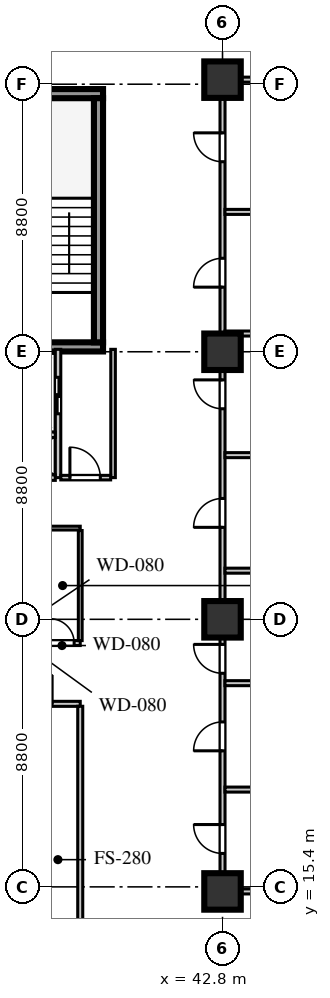
"""IFC4 building model, lengths in metres.
Left out: names, types, materials, properties, quantities, classifications, styles, units other than length and angle.
Written with IfcOpenShell. Run it as: python <this file> out.ifc"""

import sys

from ifc_helpers import new_model, si_unit, direction, frame, frame_2d, origin, origin_2d, place, context, subcontext, project, spatial, rectangle, extrude, element, fill, save


model = new_model("IFC4")
c1 = context("Model", 3, precision=1e-05, world=origin(), true_north=direction((0.0, 1.0)))
c2 = subcontext(c1, "Body", "Model", "MODEL_VIEW")
j1 = project(units=[si_unit("LENGTHUNIT", "METRE"), si_unit("PLANEANGLEUNIT", "RADIAN")], contexts=[c1])
p1 = place(None, origin())
s1 = spatial("IfcSite", under=j1, at=p1, CompositionType="ELEMENT")
p2 = place(p1, origin())
s2 = spatial("IfcBuilding", under=s1, at=p2, CompositionType="ELEMENT")
p3 = place(p2, frame((0.0, 0.0, 66.0)))
s3 = spatial("IfcBuildingStorey", under=s2, at=p3, CompositionType="ELEMENT", Elevation=66.0)
for number, where, z_axis, x_axis in (
    (1, (34.4, 33.16, 0.0), (0.0, 0.0, 1.0), (1.0, 0.0, 0.0)),
    (2, (34.4, 41.49, 0.0), (0.0, 0.0, 1.0), (1.0, 0.0, 0.0)),
):
    element("IfcWall", number, at=place(p3, frame(where, z_axis=z_axis, x_axis=x_axis)), inside=s3, PredefinedType="SHEAR", context=c2, shape_type="SweptSolid", body=[
        extrude(rectangle(XDim=4.47, YDim=0.3, at=frame_2d((2.235, 0.0))), origin(), (0.0, 0.0, 1.0), 3.72),
    ])
p4 = place(p3, frame((38.72, 33.31, 0.0), z_axis=(0.0, 0.0, 1.0), x_axis=(0.0, 1.0, 0.0)))
e3 = element("IfcWall", 3, at=p4, inside=s3, PredefinedType="SHEAR", context=c2, shape_type="SweptSolid", body=[
    extrude(rectangle(XDim=8.03, YDim=0.3, at=frame_2d((4.015, 0.0))), origin(), (0.0, 0.0, 1.0), 3.72),
])
for number, where, z_axis, x_axis in (
    (4, (42.8, 15.25, 0.0), (0.0, 0.0, 1.0), (1.0, 0.0, 0.0)),
    (5, (42.8, 24.2, 0.0), (0.0, 0.0, 1.0), (1.0, 0.0, 0.0)),
    (6, (42.8, 33.0, 0.0), (0.0, 0.0, 1.0), (1.0, 0.0, 0.0)),
    (7, (42.8, 41.95, 0.0), (0.0, 0.0, 1.0), (1.0, 0.0, 0.0)),
):
    element("IfcColumn", number, at=place(p3, frame(where, z_axis=z_axis, x_axis=x_axis)), inside=s3, PredefinedType="COLUMN", context=c2, shape_type="SweptSolid", body=[
        extrude(rectangle(XDim=1.2, YDim=1.2, at=origin_2d()), origin(), (0.0, 0.0, 1.0), 3.72),
    ])
p5 = place(p3, frame((37.39, 28.86, 0.0), z_axis=(0.0, 0.0, 1.0), x_axis=(0.0, 1.0, 0.0)))
e8 = element("IfcWall", 8, at=p5, inside=s3, PredefinedType="SOLIDWALL", context=c2, shape_type="SweptSolid", body=[
    extrude(rectangle(XDim=4.22, YDim=0.18, at=frame_2d((2.11, 0.0))), origin(), (0.0, 0.0, 1.0), 3.72),
])
p6 = place(p5, frame((2.1, 0.0, 0.0)))
e9 = element("IfcOpeningElement", 9, at=p6, cuts=e8, PredefinedType="OPENING", context=c2, shape_type="SweptSolid", body=[
    extrude(rectangle(XDim=1.2, YDim=2.12, at=frame_2d((0.6, 1.06))), frame((0.0, 0.1, 0.0), z_axis=(0.0, -1.0, 0.0), x_axis=(1.0, 0.0, 0.0)), (0.0, 0.0, 1.0), 0.2),
])
for number, where, z_axis, x_axis in (
    (10, (35.05, 28.86, 0.0), (0.0, 0.0, 1.0), (1.0, 0.0, 0.0)),
    (11, (35.05, 30.27, 0.0), (0.0, 0.0, 1.0), (1.0, 0.0, 0.0)),
):
    element("IfcWall", number, at=place(p3, frame(where, z_axis=z_axis, x_axis=x_axis)), inside=s3, PredefinedType="SOLIDWALL", context=c2, shape_type="SweptSolid", body=[
        extrude(rectangle(XDim=2.25, YDim=0.18, at=frame_2d((1.125, 0.0))), origin(), (0.0, 0.0, 1.0), 3.72),
    ])
p7 = place(p3, frame((39.2, 28.86, 0.0), z_axis=(0.0, 0.0, 1.0), x_axis=(0.0, 1.0, 0.0)))
e12 = element("IfcWall", 12, at=p7, inside=s3, PredefinedType="PARTITIONING", context=c2, shape_type="SweptSolid", body=[
    extrude(rectangle(XDim=4.22, YDim=0.15, at=frame_2d((2.11, 0.0))), origin(), (0.0, 0.0, 1.0), 3.72),
])
p8 = place(p3, frame((37.48, 28.86, 0.0), z_axis=(0.0, 0.0, 1.0), x_axis=(1.0, 0.0, 0.0)))
e13 = element("IfcWall", 13, at=p8, inside=s3, PredefinedType="PARTITIONING", context=c2, shape_type="SweptSolid", body=[
    extrude(rectangle(XDim=1.64, YDim=0.15, at=frame_2d((0.82, 0.0))), origin(), (0.0, 0.0, 1.0), 3.72),
])
p9 = place(p8, frame((0.3, 0.0, 0.0)))
e14 = element("IfcOpeningElement", 14, at=p9, cuts=e13, PredefinedType="OPENING", context=c2, shape_type="SweptSolid", body=[
    extrude(rectangle(XDim=1.0, YDim=2.1, at=frame_2d((0.5, 1.05))), frame((0.0, 0.085, 0.0), z_axis=(0.0, -1.0, 0.0), x_axis=(1.0, 0.0, 0.0)), (0.0, 0.0, 1.0), 0.17),
])
p10 = place(p3, frame((25.25, 21.42, 0.0), z_axis=(0.0, 0.0, 1.0), x_axis=(1.0, 0.0, 0.0)))
e15 = element("IfcWall", 15, at=p10, inside=s3, PredefinedType="PARTITIONING", context=c2, shape_type="SweptSolid", body=[
    extrude(rectangle(XDim=12.87, YDim=0.165, at=frame_2d((6.435, 0.0))), origin(), (0.0, 0.0, 1.0), 3.32),
])
p11 = place(p10, frame((0.825, 0.0, 0.0)))
e16 = element("IfcOpeningElement", 16, at=p11, cuts=e15, PredefinedType="OPENING", context=c2, shape_type="SweptSolid", body=[
    extrude(rectangle(XDim=0.95, YDim=2.08, at=frame_2d((0.475, 1.04))), frame((0.0, 0.093, 0.0), z_axis=(0.0, -1.0, 0.0), x_axis=(1.0, 0.0, 0.0)), (0.0, 0.0, 1.0), 0.185),
])
p12 = place(p10, frame((3.325, 0.0, 0.0)))
e17 = element("IfcOpeningElement", 17, at=p12, cuts=e15, PredefinedType="OPENING", context=c2, shape_type="SweptSolid", body=[
    extrude(rectangle(XDim=0.95, YDim=2.08, at=frame_2d((0.475, 1.04))), frame((0.0, 0.093, 0.0), z_axis=(0.0, -1.0, 0.0), x_axis=(1.0, 0.0, 0.0)), (0.0, 0.0, 1.0), 0.185),
])
p13 = place(p10, frame((5.825, 0.0, 0.0)))
e18 = element("IfcOpeningElement", 18, at=p13, cuts=e15, PredefinedType="OPENING", context=c2, shape_type="SweptSolid", body=[
    extrude(rectangle(XDim=0.95, YDim=2.08, at=frame_2d((0.475, 1.04))), frame((0.0, 0.093, 0.0), z_axis=(0.0, -1.0, 0.0), x_axis=(1.0, 0.0, 0.0)), (0.0, 0.0, 1.0), 0.185),
])
p14 = place(p10, frame((8.375, 0.0, 0.0)))
e19 = element("IfcOpeningElement", 19, at=p14, cuts=e15, PredefinedType="OPENING", context=c2, shape_type="SweptSolid", body=[
    extrude(rectangle(XDim=0.95, YDim=2.08, at=frame_2d((0.475, 1.04))), frame((0.0, 0.093, 0.0), z_axis=(0.0, -1.0, 0.0), x_axis=(1.0, 0.0, 0.0)), (0.0, 0.0, 1.0), 0.185),
])
p15 = place(p10, frame((10.995, 0.0, 0.0)))
e20 = element("IfcOpeningElement", 20, at=p15, cuts=e15, PredefinedType="OPENING", context=c2, shape_type="SweptSolid", body=[
    extrude(rectangle(XDim=0.95, YDim=2.08, at=frame_2d((0.475, 1.04))), frame((0.0, 0.093, 0.0), z_axis=(0.0, -1.0, 0.0), x_axis=(1.0, 0.0, 0.0)), (0.0, 0.0, 1.0), 0.185),
])
p16 = place(p3, frame((38.12, 6.88, 0.0), z_axis=(0.0, 0.0, 1.0), x_axis=(0.0, 1.0, 0.0)))
e21 = element("IfcWall", 21, at=p16, inside=s3, PredefinedType="PARTITIONING", context=c2, shape_type="SweptSolid", body=[
    extrude(rectangle(XDim=14.46, YDim=0.165, at=frame_2d((7.23, 0.0))), origin(), (0.0, 0.0, 1.0), 3.72),
])
p17 = place(p3, frame((34.6, 23.42, 0.0), z_axis=(0.0, 0.0, 1.0), x_axis=(1.0, 0.0, 0.0)))
e22 = element("IfcWall", 22, at=p17, inside=s3, PredefinedType="PARTITIONING", context=c2, shape_type="SweptSolid", body=[
    extrude(rectangle(XDim=3.52, YDim=0.165, at=frame_2d((1.76, 0.0))), origin(), (0.0, 0.0, 1.0), 3.72),
])
p18 = place(p17, frame((0.22, 0.0, 0.0)))
e23 = element("IfcOpeningElement", 23, at=p18, cuts=e22, PredefinedType="OPENING", context=c2, shape_type="SweptSolid", body=[
    extrude(rectangle(XDim=0.8, YDim=2.05, at=frame_2d((0.4, 1.025))), frame((0.0, 0.093, 0.0), z_axis=(0.0, -1.0, 0.0), x_axis=(1.0, 0.0, 0.0)), (0.0, 0.0, 1.0), 0.185),
])
p19 = place(p17, frame((1.38, 0.0, 0.0)))
e24 = element("IfcOpeningElement", 24, at=p19, cuts=e22, PredefinedType="OPENING", context=c2, shape_type="SweptSolid", body=[
    extrude(rectangle(XDim=0.8, YDim=2.05, at=frame_2d((0.4, 1.025))), frame((0.0, 0.093, 0.0), z_axis=(0.0, -1.0, 0.0), x_axis=(1.0, 0.0, 0.0)), (0.0, 0.0, 1.0), 0.185),
])
p20 = place(p17, frame((2.52, 0.0, 0.0)))
e25 = element("IfcOpeningElement", 25, at=p20, cuts=e22, PredefinedType="OPENING", context=c2, shape_type="SweptSolid", body=[
    extrude(rectangle(XDim=0.8, YDim=2.05, at=frame_2d((0.4, 1.025))), frame((0.0, 0.093, 0.0), z_axis=(0.0, -1.0, 0.0), x_axis=(1.0, 0.0, 0.0)), (0.0, 0.0, 1.0), 0.185),
])
p21 = place(p3, frame((42.8, 15.25, 0.0), z_axis=(0.0, 0.0, 1.0), x_axis=(0.0, 1.0, 0.0)))
e26 = element("IfcWall", 26, at=p21, inside=s3, PredefinedType="PARTITIONING", context=c2, shape_type="SweptSolid", body=[
    extrude(rectangle(XDim=26.7, YDim=0.165, at=frame_2d((13.35, 0.0))), origin(), (0.0, 0.0, 1.0), 3.02),
])
p22 = place(p21, frame((1.25, 0.0, 0.0)))
e27 = element("IfcOpeningElement", 27, at=p22, cuts=e26, PredefinedType="OPENING", context=c2, shape_type="SweptSolid", body=[
    extrude(rectangle(XDim=0.95, YDim=2.08, at=frame_2d((0.475, 1.04))), frame((0.0, 0.093, 0.0), z_axis=(0.0, -1.0, 0.0), x_axis=(1.0, 0.0, 0.0)), (0.0, 0.0, 1.0), 0.185),
])
p23 = place(p21, frame((4.625, 0.0, 0.0)))
e28 = element("IfcOpeningElement", 28, at=p23, cuts=e26, PredefinedType="OPENING", context=c2, shape_type="SweptSolid", body=[
    extrude(rectangle(XDim=0.95, YDim=2.08, at=frame_2d((0.475, 1.04))), frame((0.0, 0.093, 0.0), z_axis=(0.0, -1.0, 0.0), x_axis=(1.0, 0.0, 0.0)), (0.0, 0.0, 1.0), 0.185),
])
p24 = place(p21, frame((7.175, 0.0, 0.0)))
e29 = element("IfcOpeningElement", 29, at=p24, cuts=e26, PredefinedType="OPENING", context=c2, shape_type="SweptSolid", body=[
    extrude(rectangle(XDim=0.95, YDim=2.08, at=frame_2d((0.475, 1.04))), frame((0.0, 0.093, 0.0), z_axis=(0.0, -1.0, 0.0), x_axis=(1.0, 0.0, 0.0)), (0.0, 0.0, 1.0), 0.185),
])
p25 = place(p21, frame((11.975, 0.0, 0.0)))
e30 = element("IfcOpeningElement", 30, at=p25, cuts=e26, PredefinedType="OPENING", context=c2, shape_type="SweptSolid", body=[
    extrude(rectangle(XDim=0.95, YDim=2.08, at=frame_2d((0.475, 1.04))), frame((0.0, 0.093, 0.0), z_axis=(0.0, -1.0, 0.0), x_axis=(1.0, 0.0, 0.0)), (0.0, 0.0, 1.0), 0.185),
])
p26 = place(p21, frame((15.875, 0.0, 0.0)))
e31 = element("IfcOpeningElement", 31, at=p26, cuts=e26, PredefinedType="OPENING", context=c2, shape_type="SweptSolid", body=[
    extrude(rectangle(XDim=0.95, YDim=2.08, at=frame_2d((0.475, 1.04))), frame((0.0, 0.093, 0.0), z_axis=(0.0, -1.0, 0.0), x_axis=(1.0, 0.0, 0.0)), (0.0, 0.0, 1.0), 0.185),
])
p27 = place(p21, frame((19.875, 0.0, 0.0)))
e32 = element("IfcOpeningElement", 32, at=p27, cuts=e26, PredefinedType="OPENING", context=c2, shape_type="SweptSolid", body=[
    extrude(rectangle(XDim=0.95, YDim=2.08, at=frame_2d((0.475, 1.04))), frame((0.0, 0.093, 0.0), z_axis=(0.0, -1.0, 0.0), x_axis=(1.0, 0.0, 0.0)), (0.0, 0.0, 1.0), 0.185),
])
p28 = place(p21, frame((24.0, 0.0, 0.0)))
e33 = element("IfcOpeningElement", 33, at=p28, cuts=e26, PredefinedType="OPENING", context=c2, shape_type="SweptSolid", body=[
    extrude(rectangle(XDim=0.95, YDim=2.08, at=frame_2d((0.475, 1.04))), frame((0.0, 0.093, 0.0), z_axis=(0.0, -1.0, 0.0), x_axis=(1.0, 0.0, 0.0)), (0.0, 0.0, 1.0), 0.185),
])
for number, where, z_axis, x_axis in (
    (34, (42.88, 15.25, 0.0), (0.0, 0.0, 1.0), (1.0, 0.0, 0.0)),
    (35, (42.88, 41.95, 0.0), (0.0, 0.0, 1.0), (1.0, 0.0, 0.0)),
):
    element("IfcWall", number, at=place(p3, frame(where, z_axis=z_axis, x_axis=x_axis)), inside=s3, PredefinedType="PARTITIONING", context=c2, shape_type="SweptSolid", body=[
        extrude(rectangle(XDim=8.64, YDim=0.165, at=frame_2d((4.32, 0.0))), origin(), (0.0, 0.0, 1.0), 3.22),
    ])
p29 = place(p3, frame((34.6, 27.2, 0.0), z_axis=(0.0, 0.0, 1.0), x_axis=(1.0, 0.0, 0.0)))
e36 = element("IfcWall", 36, at=p29, inside=s3, PredefinedType="PLUMBINGWALL", context=c2, shape_type="SweptSolid", body=[
    extrude(rectangle(XDim=3.52, YDim=0.125, at=frame_2d((1.76, 0.0))), origin(), (0.0, 0.0, 1.0), 3.32),
])
p30 = place(p3, frame((38.12, 23.5, 0.0), z_axis=(0.0, 0.0, 1.0), x_axis=(0.0, 1.0, 0.0)))
e37 = element("IfcWall", 37, at=p30, inside=s3, PredefinedType="PLUMBINGWALL", context=c2, shape_type="SweptSolid", body=[
    extrude(rectangle(XDim=3.62, YDim=0.125, at=frame_2d((1.81, 0.0))), origin(), (0.0, 0.0, 1.0), 3.72),
])
for number, where, z_axis, x_axis in (
    (38, (42.88, 18.6, 0.0), (0.0, 0.0, 1.0), (1.0, 0.0, 0.0)),
    (39, (42.88, 22.1, 0.0), (0.0, 0.0, 1.0), (1.0, 0.0, 0.0)),
    (40, (42.88, 25.8, 0.0), (0.0, 0.0, 1.0), (1.0, 0.0, 0.0)),
    (41, (42.88, 29.6, 0.0), (0.0, 0.0, 1.0), (1.0, 0.0, 0.0)),
    (42, (42.88, 33.6, 0.0), (0.0, 0.0, 1.0), (1.0, 0.0, 0.0)),
    (43, (42.88, 37.6, 0.0), (0.0, 0.0, 1.0), (1.0, 0.0, 0.0)),
):
    element("IfcWall", number, at=place(p3, frame(where, z_axis=z_axis, x_axis=x_axis)), inside=s3, PredefinedType="PARTITIONING", context=c2, shape_type="SweptSolid", body=[
        extrude(rectangle(XDim=8.64, YDim=0.165, at=frame_2d((4.32, 0.0))), origin(), (0.0, 0.0, 1.0), 3.72),
    ])
p31 = place(p6, frame((1.2, 0.0, 0.0), z_axis=(0.0, 0.0, 1.0), x_axis=(-1.0, 0.0, 0.0)))
e44 = element("IfcDoor", 44, at=p31, inside=s3, OperationType="DOUBLE_DOOR_SLIDING", PredefinedType="DOOR", context=c2, shape_type="SweptSolid", body=[
    extrude(rectangle(XDim=1.2, YDim=2.12, at=frame_2d((0.6, 1.06))), frame((0.0, 0.025, 0.0), z_axis=(0.0, -1.0, 0.0), x_axis=(1.0, 0.0, 0.0)), (0.0, 0.0, 1.0), 0.05),
])
fill(e9, e44)
p32 = place(p9, origin())
e45 = element("IfcDoor", 45, at=p32, inside=s3, OperationType="SINGLE_SWING_LEFT", PredefinedType="DOOR", context=c2, shape_type="SweptSolid", body=[
    extrude(rectangle(XDim=1.0, YDim=2.1, at=frame_2d((0.5, 1.05))), frame((0.0, 0.025, 0.0), z_axis=(0.0, -1.0, 0.0), x_axis=(1.0, 0.0, 0.0)), (0.0, 0.0, 1.0), 0.05),
])
fill(e14, e45)
p33 = place(p20, origin())
e46 = element("IfcDoor", 46, at=p33, inside=s3, OperationType="SINGLE_SWING_LEFT", PredefinedType="DOOR", context=c2, shape_type="SweptSolid", body=[
    extrude(rectangle(XDim=0.8, YDim=2.05, at=frame_2d((0.4, 1.025))), frame((0.0, 0.025, 0.0), z_axis=(0.0, -1.0, 0.0), x_axis=(1.0, 0.0, 0.0)), (0.0, 0.0, 1.0), 0.05),
])
fill(e25, e46)
p34 = place(p22, origin())
e47 = element("IfcDoor", 47, at=p34, inside=s3, OperationType="SINGLE_SWING_RIGHT", PredefinedType="DOOR", context=c2, shape_type="SweptSolid", body=[
    extrude(rectangle(XDim=0.95, YDim=2.08, at=frame_2d((0.475, 1.04))), frame((0.0, 0.025, 0.0), z_axis=(0.0, -1.0, 0.0), x_axis=(1.0, 0.0, 0.0)), (0.0, 0.0, 1.0), 0.05),
])
fill(e27, e47)
p35 = place(p23, origin())
e48 = element("IfcDoor", 48, at=p35, inside=s3, OperationType="SINGLE_SWING_LEFT", PredefinedType="DOOR", context=c2, shape_type="SweptSolid", body=[
    extrude(rectangle(XDim=0.95, YDim=2.08, at=frame_2d((0.475, 1.04))), frame((0.0, 0.025, 0.0), z_axis=(0.0, -1.0, 0.0), x_axis=(1.0, 0.0, 0.0)), (0.0, 0.0, 1.0), 0.05),
])
fill(e28, e48)
p36 = place(p24, origin())
e49 = element("IfcDoor", 49, at=p36, inside=s3, OperationType="SINGLE_SWING_RIGHT", PredefinedType="DOOR", context=c2, shape_type="SweptSolid", body=[
    extrude(rectangle(XDim=0.95, YDim=2.08, at=frame_2d((0.475, 1.04))), frame((0.0, 0.025, 0.0), z_axis=(0.0, -1.0, 0.0), x_axis=(1.0, 0.0, 0.0)), (0.0, 0.0, 1.0), 0.05),
])
fill(e29, e49)
p37 = place(p25, origin())
e50 = element("IfcDoor", 50, at=p37, inside=s3, OperationType="SINGLE_SWING_LEFT", PredefinedType="DOOR", context=c2, shape_type="SweptSolid", body=[
    extrude(rectangle(XDim=0.95, YDim=2.08, at=frame_2d((0.475, 1.04))), frame((0.0, 0.025, 0.0), z_axis=(0.0, -1.0, 0.0), x_axis=(1.0, 0.0, 0.0)), (0.0, 0.0, 1.0), 0.05),
])
fill(e30, e50)
p38 = place(p26, origin())
e51 = element("IfcDoor", 51, at=p38, inside=s3, OperationType="SINGLE_SWING_RIGHT", PredefinedType="DOOR", context=c2, shape_type="SweptSolid", body=[
    extrude(rectangle(XDim=0.95, YDim=2.08, at=frame_2d((0.475, 1.04))), frame((0.0, 0.025, 0.0), z_axis=(0.0, -1.0, 0.0), x_axis=(1.0, 0.0, 0.0)), (0.0, 0.0, 1.0), 0.05),
])
fill(e31, e51)
p39 = place(p27, origin())
e52 = element("IfcDoor", 52, at=p39, inside=s3, OperationType="SINGLE_SWING_LEFT", PredefinedType="DOOR", context=c2, shape_type="SweptSolid", body=[
    extrude(rectangle(XDim=0.95, YDim=2.08, at=frame_2d((0.475, 1.04))), frame((0.0, 0.025, 0.0), z_axis=(0.0, -1.0, 0.0), x_axis=(1.0, 0.0, 0.0)), (0.0, 0.0, 1.0), 0.05),
])
fill(e32, e52)
p40 = place(p28, origin())
e53 = element("IfcDoor", 53, at=p40, inside=s3, OperationType="SINGLE_SWING_RIGHT", PredefinedType="DOOR", context=c2, shape_type="SweptSolid", body=[
    extrude(rectangle(XDim=0.95, YDim=2.08, at=frame_2d((0.475, 1.04))), frame((0.0, 0.025, 0.0), z_axis=(0.0, -1.0, 0.0), x_axis=(1.0, 0.0, 0.0)), (0.0, 0.0, 1.0), 0.05),
])
fill(e33, e53)
save(model, sys.argv[1])
